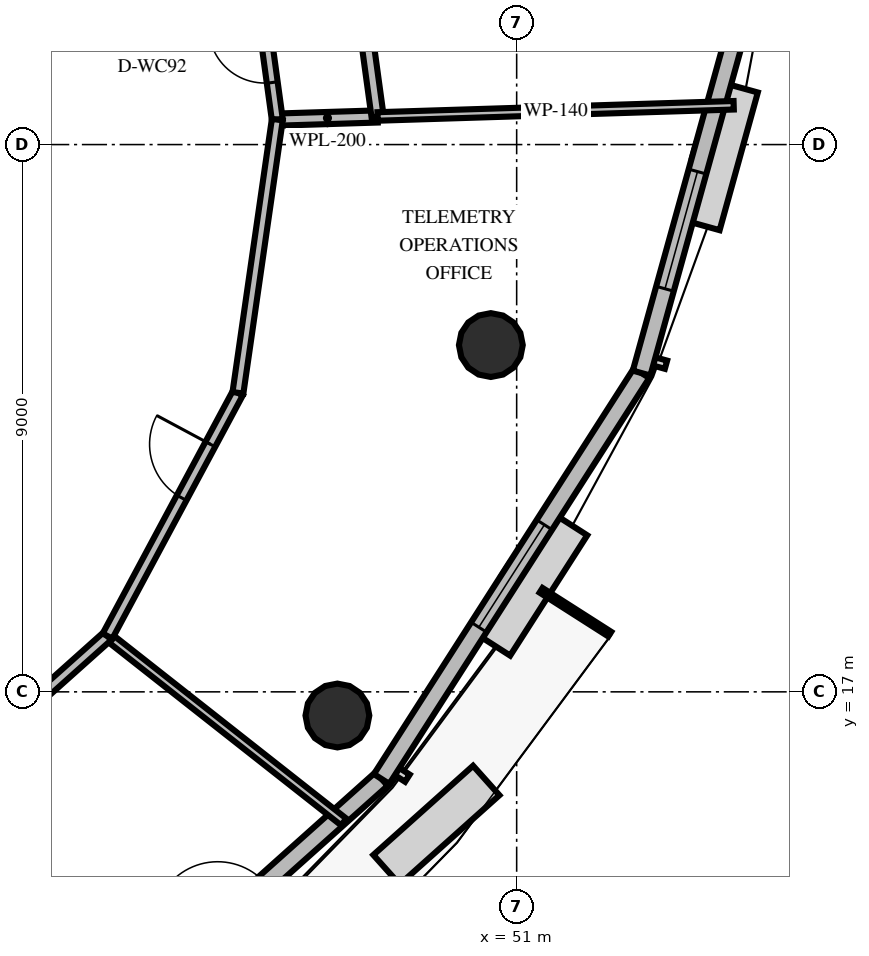
"""IFC4 building model, lengths in metres.
Left out: names, types, materials, properties, quantities, classifications, styles, units other than length and angle.
Written with IfcOpenShell. Run it as: python <this file> out.ifc"""

import sys

from ifc_helpers import new_model, si_unit, direction, frame, frame_2d, origin, origin_2d, place, context, subcontext, project, spatial, rectangle, circle, extrude, element, fill, save


model = new_model("IFC4")
c1 = context("Model", 3, precision=1e-05, world=origin(), true_north=direction((0.0, 1.0)))
c2 = subcontext(c1, "Body", "Model", "MODEL_VIEW")
j1 = project(units=[si_unit("LENGTHUNIT", "METRE"), si_unit("PLANEANGLEUNIT", "RADIAN")], contexts=[c1])
p1 = place(None, origin())
s1 = spatial("IfcSite", under=j1, at=p1, CompositionType="ELEMENT")
p2 = place(p1, origin())
s2 = spatial("IfcBuilding", under=s1, at=p2, CompositionType="ELEMENT")
p3 = place(p2, frame((0.0, 0.0, 206.0)))
s3 = spatial("IfcBuildingStorey", under=s2, at=p3, CompositionType="ELEMENT", Elevation=206.0)
for number, where, z_axis, x_axis in (
    (1, (48.052, 16.611, 0.0), (0.0, 0.0, 1.0), (1.0, 0.0, 0.0)),
    (2, (50.575, 22.703, 0.0), (0.0, 0.0, 1.0), (1.0, 0.0, 0.0)),
):
    element("IfcColumn", number, at=place(p3, frame(where, z_axis=z_axis, x_axis=x_axis)), inside=s3, PredefinedType="COLUMN", context=c2, shape_type="SweptSolid", body=[
        extrude(circle(Radius=0.525, at=origin_2d()), origin(), (0.0, 0.0, 1.0), 3.6),
    ])
p4 = place(p3, frame((42.72, 10.15, 0.0), z_axis=(0.0, 0.0, 1.0), x_axis=(0.745478547566, 0.666529620586, 0.0)))
e3 = element("IfcWall", 3, at=p4, inside=s3, PredefinedType="SOLIDWALL", context=c2, shape_type="SweptSolid", body=[
    extrude(rectangle(XDim=8.127, YDim=0.3, at=frame_2d((4.063, 0.0))), origin(), (0.0, 0.0, 1.0), 2.66),
])
p5 = place(p4, frame((4.51, 0.0, 0.0)))
e4 = element("IfcOpeningElement", 4, at=p5, cuts=e3, PredefinedType="OPENING", context=c2, shape_type="SweptSolid", body=[
    extrude(rectangle(XDim=1.05, YDim=2.15, at=frame_2d((0.525, 1.075))), frame((0.0, 0.16, 0.0), z_axis=(0.0, -1.0, 0.0), x_axis=(1.0, 0.0, 0.0)), (0.0, 0.0, 1.0), 0.32),
])
p6 = place(p3, frame((48.779, 15.567, 0.0), z_axis=(0.0, 0.0, 1.0), x_axis=(0.539397988858, 0.842050954287, 0.0)))
e5 = element("IfcWall", 5, at=p6, inside=s3, PredefinedType="SOLIDWALL", context=c2, shape_type="SweptSolid", body=[
    extrude(rectangle(XDim=7.927, YDim=0.3, at=frame_2d((3.964, 0.0))), origin(), (0.0, 0.0, 1.0), 2.66),
])
p7 = place(p6, frame((2.964, 0.0, 0.8)))
e6 = element("IfcOpeningElement", 6, at=p7, cuts=e5, PredefinedType="OPENING", context=c2, shape_type="SweptSolid", body=[
    extrude(rectangle(XDim=2.0, YDim=1.85, at=frame_2d((1.0, 0.925))), frame((0.0, 0.16, 0.0), z_axis=(0.0, -1.0, 0.0), x_axis=(1.0, 0.0, 0.0)), (0.0, 0.0, 1.0), 0.32),
])
p8 = place(p3, frame((53.055, 22.242, 0.0), z_axis=(0.0, 0.0, 1.0), x_axis=(0.267289798327, 0.963616191079, 0.0)))
e7 = element("IfcWall", 7, at=p8, inside=s3, PredefinedType="SOLIDWALL", context=c2, shape_type="SweptSolid", body=[
    extrude(rectangle(XDim=7.397, YDim=0.3, at=frame_2d((3.699, 0.0))), origin(), (0.0, 0.0, 1.0), 2.66),
])
p9 = place(p8, frame((1.439, 0.0, 0.8)))
e8 = element("IfcOpeningElement", 8, at=p9, cuts=e7, PredefinedType="OPENING", context=c2, shape_type="SweptSolid", body=[
    extrude(rectangle(XDim=2.0, YDim=1.85, at=frame_2d((1.0, 0.925))), frame((0.0, 0.16, 0.0), z_axis=(0.0, -1.0, 0.0), x_axis=(1.0, 0.0, 0.0)), (0.0, 0.0, 1.0), 0.32),
])
p10 = place(p3, frame((47.064, 26.41, 0.0), z_axis=(0.0, 0.0, 1.0), x_axis=(0.999503083643, 0.031521195857, 0.0)))
e9 = element("IfcWall", 9, at=p10, inside=s3, PredefinedType="PLUMBINGWALL", context=c2, shape_type="SweptSolid", body=[
    extrude(rectangle(XDim=1.65, YDim=0.2, at=frame_2d((0.825, 0.0))), origin(), (0.0, 0.0, 1.0), 2.46),
])
p11 = place(p3, frame((48.713, 26.462, 0.0), z_axis=(0.0, 0.0, 1.0), x_axis=(-0.135665481922, 0.990754700728, 0.0)))
e10 = element("IfcWall", 10, at=p11, inside=s3, PredefinedType="PLUMBINGWALL", context=c2, shape_type="SweptSolid", body=[
    extrude(rectangle(XDim=3.077, YDim=0.2, at=frame_2d((1.539, 0.0))), origin(), (0.0, 0.0, 1.0), 2.46),
])
p12 = place(p3, frame((47.064, 26.41, 0.0), z_axis=(0.0, 0.0, 1.0), x_axis=(-0.135802915103, 0.990735872092, 0.0)))
e11 = element("IfcWall", 11, at=p12, inside=s3, PredefinedType="PARTITIONING", context=c2, shape_type="SweptSolid", body=[
    extrude(rectangle(XDim=2.733, YDim=0.18, at=frame_2d((1.366, 0.0))), origin(), (0.0, 0.0, 1.0), 2.46),
])
p13 = place(p12, frame((0.616, 0.0, 0.0)))
e12 = element("IfcOpeningElement", 12, at=p13, cuts=e11, PredefinedType="OPENING", context=c2, shape_type="SweptSolid", body=[
    extrude(rectangle(XDim=0.92, YDim=2.1, at=frame_2d((0.46, 1.05))), frame((0.0, 0.1, 0.0), z_axis=(0.0, -1.0, 0.0), x_axis=(1.0, 0.0, 0.0)), (0.0, 0.0, 1.0), 0.2),
])
p14 = place(p3, frame((48.713, 26.462, 0.0), z_axis=(0.0, 0.0, 1.0), x_axis=(0.999506368403, 0.031416866841, 0.0)))
e13 = element("IfcWall", 13, at=p14, inside=s3, PredefinedType="PARTITIONING", context=c2, shape_type="SweptSolid", body=[
    extrude(rectangle(XDim=5.859, YDim=0.14, at=frame_2d((2.93, 0.0))), origin(), (0.0, 0.0, 1.0), 2.46),
])
p15 = place(p3, frame((44.271, 17.917, 0.0), z_axis=(0.0, 0.0, 1.0), x_axis=(0.785869116864, -0.618392861504, 0.0)))
e14 = element("IfcWall", 14, at=p15, inside=s3, PredefinedType="PARTITIONING", context=c2, shape_type="SweptSolid", body=[
    extrude(rectangle(XDim=4.943, YDim=0.14, at=frame_2d((2.472, 0.0))), origin(), (0.0, 0.0, 1.0), 2.46),
])
p16 = place(p3, frame((40.887, 14.892, 0.0), z_axis=(0.0, 0.0, 1.0), x_axis=(0.745456496411, 0.66655428283, 0.0)))
e15 = element("IfcWall", 15, at=p16, inside=s3, PredefinedType="PARTITIONING", context=c2, shape_type="SweptSolid", body=[
    extrude(rectangle(XDim=4.539, YDim=0.18, at=frame_2d((2.27, 0.0))), origin(), (0.0, 0.0, 1.0), 2.46),
])
p17 = place(p3, frame((44.271, 17.917, 0.0), z_axis=(0.0, 0.0, 1.0), x_axis=(0.472569149638, 0.881293593992, 0.0)))
e16 = element("IfcWall", 16, at=p17, inside=s3, PredefinedType="PARTITIONING", context=c2, shape_type="SweptSolid", body=[
    extrude(rectangle(XDim=4.539, YDim=0.18, at=frame_2d((2.27, 0.0))), origin(), (0.0, 0.0, 1.0), 2.46),
])
p18 = place(p17, frame((2.579, 0.0, 0.0)))
e17 = element("IfcOpeningElement", 17, at=p18, cuts=e16, PredefinedType="OPENING", context=c2, shape_type="SweptSolid", body=[
    extrude(rectangle(XDim=1.0, YDim=2.15, at=frame_2d((0.5, 1.075))), frame((0.0, 0.1, 0.0), z_axis=(0.0, -1.0, 0.0), x_axis=(1.0, 0.0, 0.0)), (0.0, 0.0, 1.0), 0.2),
])
p19 = place(p3, frame((46.416, 21.918, 0.0), z_axis=(0.0, 0.0, 1.0), x_axis=(0.142693812172, 0.989766879607, 0.0)))
e18 = element("IfcWall", 18, at=p19, inside=s3, PredefinedType="PARTITIONING", context=c2, shape_type="SweptSolid", body=[
    extrude(rectangle(XDim=4.539, YDim=0.18, at=frame_2d((2.27, 0.0))), origin(), (0.0, 0.0, 1.0), 2.46),
])
p20 = place(p7, origin())
e19 = element("IfcWindow", 19, at=p20, inside=s3, PartitioningType="SINGLE_PANEL", PredefinedType="WINDOW", context=c2, shape_type="SweptSolid", body=[
    extrude(rectangle(XDim=2.0, YDim=1.85, at=frame_2d((1.0, 0.925))), frame((0.0, 0.03, 0.0), z_axis=(0.0, -1.0, 0.0), x_axis=(1.0, 0.0, 0.0)), (0.0, 0.0, 1.0), 0.06),
])
fill(e6, e19)
p21 = place(p9, origin())
e20 = element("IfcWindow", 20, at=p21, inside=s3, PartitioningType="SINGLE_PANEL", PredefinedType="WINDOW", context=c2, shape_type="SweptSolid", body=[
    extrude(rectangle(XDim=2.0, YDim=1.85, at=frame_2d((1.0, 0.925))), frame((0.0, 0.03, 0.0), z_axis=(0.0, -1.0, 0.0), x_axis=(1.0, 0.0, 0.0)), (0.0, 0.0, 1.0), 0.06),
])
fill(e8, e20)
p22 = place(p13, origin())
e21 = element("IfcDoor", 21, at=p22, inside=s3, OperationType="SINGLE_SWING_RIGHT", PredefinedType="DOOR", context=c2, shape_type="SweptSolid", body=[
    extrude(rectangle(XDim=0.92, YDim=2.1, at=frame_2d((0.46, 1.05))), frame((0.0, 0.025, 0.0), z_axis=(0.0, -1.0, 0.0), x_axis=(1.0, 0.0, 0.0)), (0.0, 0.0, 1.0), 0.05),
])
fill(e12, e21)
p23 = place(p18, origin())
e22 = element("IfcDoor", 22, at=p23, inside=s3, OperationType="SINGLE_SWING_RIGHT", PredefinedType="DOOR", context=c2, shape_type="SweptSolid", body=[
    extrude(rectangle(XDim=1.0, YDim=2.15, at=frame_2d((0.5, 1.075))), frame((0.0, 0.025, 0.0), z_axis=(0.0, -1.0, 0.0), x_axis=(1.0, 0.0, 0.0)), (0.0, 0.0, 1.0), 0.05),
])
fill(e17, e22)
save(model, sys.argv[1])
